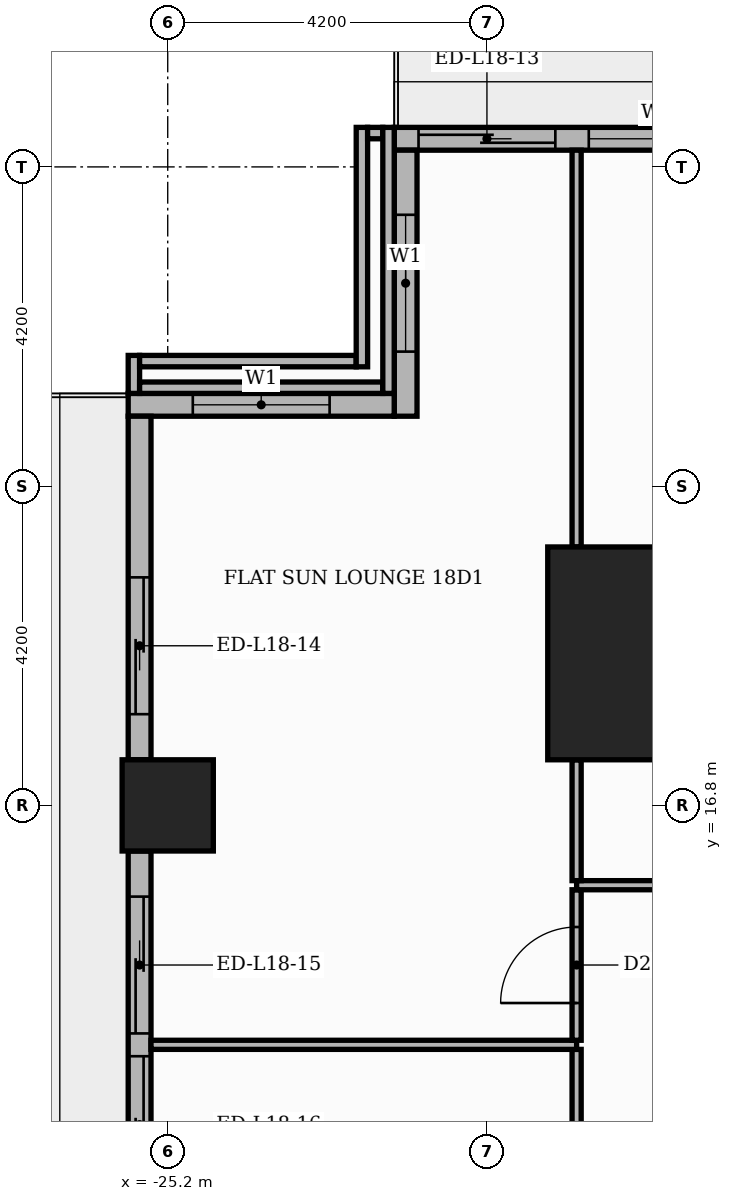
"""IFC4 building model, lengths in metres.
Left out: names, types, materials, properties, quantities, classifications, styles, units other than length and angle.
Written with IfcOpenShell. Run it as: python <this file> out.ifc"""

import sys

from ifc_helpers import new_model, si_unit, direction, frame, frame_2d, origin, origin_2d, place, context, subcontext, project, spatial, rectangle, extrude, element, fill, save


model = new_model("IFC4")
c1 = context("Model", 3, precision=1e-05, world=origin(), true_north=direction((0.0, 1.0)))
c2 = subcontext(c1, "Body", "Model", "MODEL_VIEW")
j1 = project(units=[si_unit("LENGTHUNIT", "METRE"), si_unit("PLANEANGLEUNIT", "RADIAN")], contexts=[c1])
p1 = place(None, origin())
s1 = spatial("IfcSite", under=j1, at=p1, CompositionType="ELEMENT")
p2 = place(p1, origin())
s2 = spatial("IfcBuilding", under=s1, at=p2, CompositionType="ELEMENT")
p3 = place(p2, frame((0.0, 0.0, 79.2)))
s3 = spatial("IfcBuildingStorey", under=s2, at=p3, CompositionType="ELEMENT", Elevation=79.2)
p4 = place(p3, frame((-18.8, 18.8, 0.0), z_axis=(0.0, 0.0, 1.0), x_axis=(1.0, 0.0, 0.0)))
e1 = element("IfcColumn", 1, at=p4, inside=s3, PredefinedType="COLUMN", context=c2, shape_type="SweptSolid", body=[
    extrude(rectangle(XDim=2.8, YDim=2.8, at=origin_2d()), origin(), (0.0, 0.0, 1.0), 3.9),
])
p5 = place(p3, frame((-25.2, 16.8, 0.0), z_axis=(0.0, 0.0, 1.0), x_axis=(1.0, 0.0, 0.0)))
e2 = element("IfcColumn", 2, at=p5, inside=s3, PredefinedType="COLUMN", context=c2, shape_type="SweptSolid", body=[
    extrude(rectangle(XDim=1.2, YDim=1.2, at=origin_2d()), origin(), (0.0, 0.0, 1.0), 3.9),
])
p6 = place(p3, frame((-17.4, 25.57, 0.0), z_axis=(0.0, 0.0, 1.0), x_axis=(-1.0, 0.0, 0.0)))
e3 = element("IfcWall", 3, at=p6, inside=s3, PredefinedType="STANDARD", context=c2, shape_type="SweptSolid", body=[
    extrude(rectangle(XDim=4.82, YDim=0.3, at=frame_2d((2.41, 0.0))), origin(), (0.0, 0.0, 1.0), 3.48),
])
p7 = place(p6, frame((2.7, 0.0, 0.0)))
e4 = element("IfcOpeningElement", 4, at=p7, cuts=e3, PredefinedType="OPENING", context=c2, shape_type="SweptSolid", body=[
    extrude(rectangle(XDim=1.8, YDim=2.4, at=frame_2d((0.9, 1.2))), frame((0.0, 0.16, 0.0), z_axis=(0.0, -1.0, 0.0), x_axis=(1.0, 0.0, 0.0)), (0.0, 0.0, 1.0), 0.32),
])
p8 = place(p6, frame((0.46, 0.0, 0.9)))
e5 = element("IfcOpeningElement", 5, at=p8, cuts=e3, PredefinedType="OPENING", context=c2, shape_type="SweptSolid", body=[
    extrude(rectangle(XDim=1.8, YDim=2.1, at=frame_2d((0.9, 1.05))), frame((0.0, 0.16, 0.0), z_axis=(0.0, -1.0, 0.0), x_axis=(1.0, 0.0, 0.0)), (0.0, 0.0, 1.0), 0.32),
])
p9 = place(p3, frame((-22.07, 25.42, 0.0), z_axis=(0.0, 0.0, 1.0), x_axis=(0.0, -1.0, 0.0)))
e6 = element("IfcWall", 6, at=p9, inside=s3, PredefinedType="STANDARD", context=c2, shape_type="SweptSolid", body=[
    extrude(rectangle(XDim=3.5, YDim=0.3, at=frame_2d((1.75, 0.0))), origin(), (0.0, 0.0, 1.0), 3.48),
])
p10 = place(p9, frame((0.85, 0.0, 0.9)))
e7 = element("IfcOpeningElement", 7, at=p10, cuts=e6, PredefinedType="OPENING", context=c2, shape_type="SweptSolid", body=[
    extrude(rectangle(XDim=1.8, YDim=2.1, at=frame_2d((0.9, 1.05))), frame((0.0, 0.16, 0.0), z_axis=(0.0, -1.0, 0.0), x_axis=(1.0, 0.0, 0.0)), (0.0, 0.0, 1.0), 0.32),
])
p11 = place(p3, frame((-22.22, 22.07, 0.0), z_axis=(0.0, 0.0, 1.0), x_axis=(-1.0, 0.0, 0.0)))
e8 = element("IfcWall", 8, at=p11, inside=s3, PredefinedType="STANDARD", context=c2, shape_type="SweptSolid", body=[
    extrude(rectangle(XDim=3.5, YDim=0.3, at=frame_2d((1.75, 0.0))), origin(), (0.0, 0.0, 1.0), 3.48),
])
p12 = place(p11, frame((0.85, 0.0, 0.9)))
e9 = element("IfcOpeningElement", 9, at=p12, cuts=e8, PredefinedType="OPENING", context=c2, shape_type="SweptSolid", body=[
    extrude(rectangle(XDim=1.8, YDim=2.1, at=frame_2d((0.9, 1.05))), frame((0.0, 0.16, 0.0), z_axis=(0.0, -1.0, 0.0), x_axis=(1.0, 0.0, 0.0)), (0.0, 0.0, 1.0), 0.32),
])
p13 = place(p3, frame((-25.57, 21.92, 0.0), z_axis=(0.0, 0.0, 1.0), x_axis=(0.0, -1.0, 0.0)))
e10 = element("IfcWall", 10, at=p13, inside=s3, PredefinedType="STANDARD", context=c2, shape_type="SweptSolid", body=[
    extrude(rectangle(XDim=4.52, YDim=0.3, at=frame_2d((2.26, 0.0))), origin(), (0.0, 0.0, 1.0), 3.48),
])
p14 = place(p13, frame((2.12, 0.0, 0.0)))
e11 = element("IfcOpeningElement", 11, at=p14, cuts=e10, PredefinedType="OPENING", context=c2, shape_type="SweptSolid", body=[
    extrude(rectangle(XDim=1.8, YDim=2.4, at=frame_2d((0.9, 1.2))), frame((0.0, 0.16, 0.0), z_axis=(0.0, -1.0, 0.0), x_axis=(1.0, 0.0, 0.0)), (0.0, 0.0, 1.0), 0.32),
])
p15 = place(p3, frame((-25.57, 16.2, 0.0), z_axis=(0.0, 0.0, 1.0), x_axis=(0.0, -1.0, 0.0)))
e12 = element("IfcWall", 12, at=p15, inside=s3, PredefinedType="STANDARD", context=c2, shape_type="SweptSolid", body=[
    extrude(rectangle(XDim=7.2, YDim=0.3, at=frame_2d((3.6, 0.0))), origin(), (0.0, 0.0, 1.0), 3.48),
])
p16 = place(p15, frame((0.6, 0.0, 0.0)))
e13 = element("IfcOpeningElement", 13, at=p16, cuts=e12, PredefinedType="OPENING", context=c2, shape_type="SweptSolid", body=[
    extrude(rectangle(XDim=1.8, YDim=2.4, at=frame_2d((0.9, 1.2))), frame((0.0, 0.16, 0.0), z_axis=(0.0, -1.0, 0.0), x_axis=(1.0, 0.0, 0.0)), (0.0, 0.0, 1.0), 0.32),
])
p17 = place(p15, frame((2.7, 0.0, 0.0)))
e14 = element("IfcOpeningElement", 14, at=p17, cuts=e12, PredefinedType="OPENING", context=c2, shape_type="SweptSolid", body=[
    extrude(rectangle(XDim=1.8, YDim=2.4, at=frame_2d((0.9, 1.2))), frame((0.0, 0.16, 0.0), z_axis=(0.0, -1.0, 0.0), x_axis=(1.0, 0.0, 0.0)), (0.0, 0.0, 1.0), 0.32),
])
p18 = place(p15, frame((4.8, 0.0, 0.9)))
e15 = element("IfcOpeningElement", 15, at=p18, cuts=e12, PredefinedType="OPENING", context=c2, shape_type="SweptSolid", body=[
    extrude(rectangle(XDim=1.8, YDim=2.1, at=frame_2d((0.9, 1.05))), frame((0.0, 0.16, 0.0), z_axis=(0.0, -1.0, 0.0), x_axis=(1.0, 0.0, 0.0)), (0.0, 0.0, 1.0), 0.32),
])
p19 = place(p3, frame((-25.645, 22.22, 0.0), z_axis=(0.0, 0.0, 1.0), x_axis=(0.0, 1.0, 0.0)))
e16 = element("IfcWall", 16, at=p19, inside=s3, PredefinedType="PARAPET", context=c2, shape_type="SweptSolid", body=[
    extrude(rectangle(XDim=0.5, YDim=0.15, at=frame_2d((0.25, 0.0))), origin(), (0.0, 0.0, 1.0), 1.1),
])
p20 = place(p3, frame((-25.57, 22.645, 0.0), z_axis=(0.0, 0.0, 1.0), x_axis=(1.0, 0.0, 0.0)))
e17 = element("IfcWall", 17, at=p20, inside=s3, PredefinedType="PARAPET", context=c2, shape_type="SweptSolid", body=[
    extrude(rectangle(XDim=2.85, YDim=0.15, at=frame_2d((1.425, 0.0))), origin(), (0.0, 0.0, 1.0), 1.1),
])
p21 = place(p3, frame((-25.57, 22.295, 0.0), z_axis=(0.0, 0.0, 1.0), x_axis=(1.0, 0.0, 0.0)))
e18 = element("IfcWall", 18, at=p21, inside=s3, PredefinedType="PARAPET", context=c2, shape_type="SweptSolid", body=[
    extrude(rectangle(XDim=3.2, YDim=0.15, at=frame_2d((1.6, 0.0))), origin(), (0.0, 0.0, 1.0), 1.1),
])
p22 = place(p3, frame((-22.645, 22.57, 0.0), z_axis=(0.0, 0.0, 1.0), x_axis=(0.0, 1.0, 0.0)))
e19 = element("IfcWall", 19, at=p22, inside=s3, PredefinedType="PARAPET", context=c2, shape_type="SweptSolid", body=[
    extrude(rectangle(XDim=3.15, YDim=0.15, at=frame_2d((1.575, 0.0))), origin(), (0.0, 0.0, 1.0), 1.1),
])
p23 = place(p3, frame((-22.57, 25.645, 0.0), z_axis=(0.0, 0.0, 1.0), x_axis=(1.0, 0.0, 0.0)))
e20 = element("IfcWall", 20, at=p23, inside=s3, PredefinedType="PARAPET", context=c2, shape_type="SweptSolid", body=[
    extrude(rectangle(XDim=0.2, YDim=0.15, at=frame_2d((0.1, 0.0))), origin(), (0.0, 0.0, 1.0), 1.1),
])
p24 = place(p3, frame((-22.295, 22.22, 0.0), z_axis=(0.0, 0.0, 1.0), x_axis=(0.0, 1.0, 0.0)))
e21 = element("IfcWall", 21, at=p24, inside=s3, PredefinedType="PARAPET", context=c2, shape_type="SweptSolid", body=[
    extrude(rectangle(XDim=3.5, YDim=0.15, at=frame_2d((1.75, 0.0))), origin(), (0.0, 0.0, 1.0), 1.1),
])
p25 = place(p3, frame((-19.82, 9.51, 0.0), z_axis=(0.0, 0.0, 1.0), x_axis=(0.0, 1.0, 0.0)))
e22 = element("IfcWall", 22, at=p25, inside=s3, PredefinedType="PARTITIONING", context=c2, shape_type="SweptSolid", body=[
    extrude(rectangle(XDim=4.08, YDim=0.12, at=frame_2d((2.04, 0.0))), origin(), (0.0, 0.0, 1.0), 3.48),
])
p26 = place(p25, frame((1.59, 0.0, 0.0)))
e23 = element("IfcOpeningElement", 23, at=p26, cuts=e22, PredefinedType="OPENING", context=c2, shape_type="SweptSolid", body=[
    extrude(rectangle(XDim=0.9, YDim=2.1, at=frame_2d((0.45, 1.05))), frame((0.0, 0.07, 0.0), z_axis=(0.0, -1.0, 0.0), x_axis=(1.0, 0.0, 0.0)), (0.0, 0.0, 1.0), 0.14),
])
p27 = place(p3, frame((-25.42, 13.65, 0.0), z_axis=(0.0, 0.0, 1.0), x_axis=(1.0, 0.0, 0.0)))
e24 = element("IfcWall", 24, at=p27, inside=s3, PredefinedType="PARTITIONING", context=c2, shape_type="SweptSolid", body=[
    extrude(rectangle(XDim=5.6, YDim=0.12, at=frame_2d((2.8, 0.0))), origin(), (0.0, 0.0, 1.0), 3.48),
])
p28 = place(p3, frame((-19.82, 13.71, 0.0), z_axis=(0.0, 0.0, 1.0), x_axis=(0.0, 1.0, 0.0)))
e25 = element("IfcWall", 25, at=p28, inside=s3, PredefinedType="PARTITIONING", context=c2, shape_type="SweptSolid", body=[
    extrude(rectangle(XDim=1.98, YDim=0.12, at=frame_2d((0.99, 0.0))), origin(), (0.0, 0.0, 1.0), 3.48),
])
p29 = place(p28, frame((0.49, 0.0, 0.0)))
e26 = element("IfcOpeningElement", 26, at=p29, cuts=e25, PredefinedType="OPENING", context=c2, shape_type="SweptSolid", body=[
    extrude(rectangle(XDim=1.0, YDim=2.1, at=frame_2d((0.5, 1.05))), frame((0.0, 0.07, 0.0), z_axis=(0.0, -1.0, 0.0), x_axis=(1.0, 0.0, 0.0)), (0.0, 0.0, 1.0), 0.14),
])
p30 = place(p3, frame((-19.82, 15.75, 0.0), z_axis=(0.0, 0.0, 1.0), x_axis=(1.0, 0.0, 0.0)))
e27 = element("IfcWall", 27, at=p30, inside=s3, PredefinedType="PARTITIONING", context=c2, shape_type="SweptSolid", body=[
    extrude(rectangle(XDim=6.07, YDim=0.12, at=frame_2d((3.035, 0.0))), origin(), (0.0, 0.0, 1.0), 3.48),
])
p31 = place(p30, frame((2.585, 0.0, 0.0)))
e28 = element("IfcOpeningElement", 28, at=p31, cuts=e27, PredefinedType="OPENING", context=c2, shape_type="SweptSolid", body=[
    extrude(rectangle(XDim=1.0, YDim=2.1, at=frame_2d((0.5, 1.05))), frame((0.0, 0.07, 0.0), z_axis=(0.0, -1.0, 0.0), x_axis=(1.0, 0.0, 0.0)), (0.0, 0.0, 1.0), 0.14),
])
p32 = place(p3, frame((-19.82, 15.81, 0.0), z_axis=(0.0, 0.0, 1.0), x_axis=(0.0, 1.0, 0.0)))
e29 = element("IfcWall", 29, at=p32, inside=s3, PredefinedType="PARTITIONING", context=c2, shape_type="SweptSolid", body=[
    extrude(rectangle(XDim=1.59, YDim=0.12, at=frame_2d((0.795, 0.0))), origin(), (0.0, 0.0, 1.0), 3.48),
])
p33 = place(p3, frame((-19.82, 20.2, 0.0), z_axis=(0.0, 0.0, 1.0), x_axis=(0.0, 1.0, 0.0)))
e30 = element("IfcWall", 30, at=p33, inside=s3, PredefinedType="PARTITIONING", context=c2, shape_type="SweptSolid", body=[
    extrude(rectangle(XDim=5.22, YDim=0.12, at=frame_2d((2.61, 0.0))), origin(), (0.0, 0.0, 1.0), 3.48),
])
p34 = place(p7, origin())
e31 = element("IfcDoor", 31, at=p34, inside=s3, OperationType="SLIDING_TO_LEFT", PredefinedType="DOOR", context=c2, shape_type="SweptSolid", body=[
    extrude(rectangle(XDim=1.8, YDim=2.4, at=frame_2d((0.9, 1.2))), frame((0.0, 0.025, 0.0), z_axis=(0.0, -1.0, 0.0), x_axis=(1.0, 0.0, 0.0)), (0.0, 0.0, 1.0), 0.05),
])
fill(e4, e31)
p35 = place(p8, origin())
e32 = element("IfcWindow", 32, at=p35, inside=s3, PartitioningType="SINGLE_PANEL", PredefinedType="WINDOW", context=c2, shape_type="SweptSolid", body=[
    extrude(rectangle(XDim=1.8, YDim=2.1, at=frame_2d((0.9, 1.05))), frame((0.0, 0.03, 0.0), z_axis=(0.0, -1.0, 0.0), x_axis=(1.0, 0.0, 0.0)), (0.0, 0.0, 1.0), 0.06),
])
fill(e5, e32)
p36 = place(p10, origin())
e33 = element("IfcWindow", 33, at=p36, inside=s3, PartitioningType="SINGLE_PANEL", PredefinedType="WINDOW", context=c2, shape_type="SweptSolid", body=[
    extrude(rectangle(XDim=1.8, YDim=2.1, at=frame_2d((0.9, 1.05))), frame((0.0, 0.03, 0.0), z_axis=(0.0, -1.0, 0.0), x_axis=(1.0, 0.0, 0.0)), (0.0, 0.0, 1.0), 0.06),
])
fill(e7, e33)
p37 = place(p12, origin())
e34 = element("IfcWindow", 34, at=p37, inside=s3, PartitioningType="SINGLE_PANEL", PredefinedType="WINDOW", context=c2, shape_type="SweptSolid", body=[
    extrude(rectangle(XDim=1.8, YDim=2.1, at=frame_2d((0.9, 1.05))), frame((0.0, 0.03, 0.0), z_axis=(0.0, -1.0, 0.0), x_axis=(1.0, 0.0, 0.0)), (0.0, 0.0, 1.0), 0.06),
])
fill(e9, e34)
p38 = place(p14, origin())
e35 = element("IfcDoor", 35, at=p38, inside=s3, OperationType="SLIDING_TO_RIGHT", PredefinedType="DOOR", context=c2, shape_type="SweptSolid", body=[
    extrude(rectangle(XDim=1.8, YDim=2.4, at=frame_2d((0.9, 1.2))), frame((0.0, 0.025, 0.0), z_axis=(0.0, -1.0, 0.0), x_axis=(1.0, 0.0, 0.0)), (0.0, 0.0, 1.0), 0.05),
])
fill(e11, e35)
p39 = place(p16, origin())
e36 = element("IfcDoor", 36, at=p39, inside=s3, OperationType="SLIDING_TO_LEFT", PredefinedType="DOOR", context=c2, shape_type="SweptSolid", body=[
    extrude(rectangle(XDim=1.8, YDim=2.4, at=frame_2d((0.9, 1.2))), frame((0.0, 0.025, 0.0), z_axis=(0.0, -1.0, 0.0), x_axis=(1.0, 0.0, 0.0)), (0.0, 0.0, 1.0), 0.05),
])
fill(e13, e36)
p40 = place(p17, origin())
e37 = element("IfcDoor", 37, at=p40, inside=s3, OperationType="SLIDING_TO_RIGHT", PredefinedType="DOOR", context=c2, shape_type="SweptSolid", body=[
    extrude(rectangle(XDim=1.8, YDim=2.4, at=frame_2d((0.9, 1.2))), frame((0.0, 0.025, 0.0), z_axis=(0.0, -1.0, 0.0), x_axis=(1.0, 0.0, 0.0)), (0.0, 0.0, 1.0), 0.05),
])
fill(e14, e37)
p41 = place(p29, origin())
e38 = element("IfcDoor", 38, at=p41, inside=s3, OperationType="SINGLE_SWING_LEFT", PredefinedType="DOOR", context=c2, shape_type="SweptSolid", body=[
    extrude(rectangle(XDim=1.0, YDim=2.1, at=frame_2d((0.5, 1.05))), frame((0.0, 0.025, 0.0), z_axis=(0.0, -1.0, 0.0), x_axis=(1.0, 0.0, 0.0)), (0.0, 0.0, 1.0), 0.05),
])
fill(e26, e38)
save(model, sys.argv[1])
